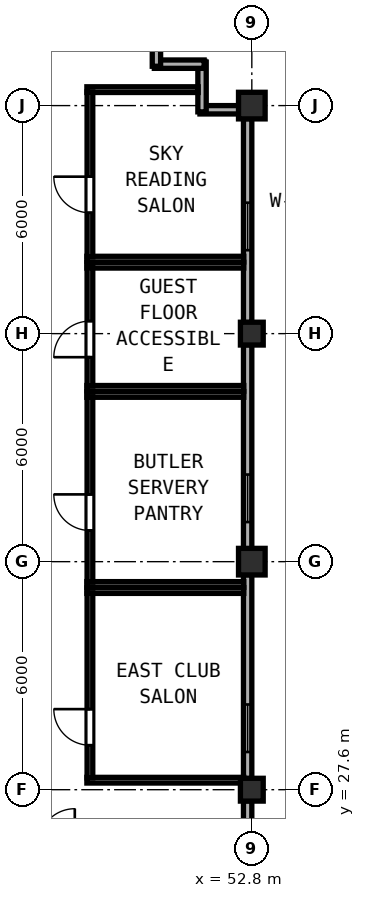
"""IFC4 building model, lengths in metres.
Left out: names, types, materials, properties, quantities, classifications, styles, units other than length and angle.
Written with IfcOpenShell. Run it as: python <this file> out.ifc"""

import sys

from ifc_helpers import new_model, si_unit, direction, frame, frame_2d, origin, origin_2d, place, context, subcontext, project, spatial, rectangle, hollow_rectangle, extrude, element, fill, save


model = new_model("IFC4")
c1 = context("Model", 3, precision=1e-05, world=origin(), true_north=direction((0.0, 1.0)))
c2 = subcontext(c1, "Body", "Model", "MODEL_VIEW")
j1 = project(units=[si_unit("LENGTHUNIT", "METRE"), si_unit("PLANEANGLEUNIT", "RADIAN")], contexts=[c1])
p1 = place(None, origin())
s1 = spatial("IfcSite", under=j1, at=p1, CompositionType="ELEMENT")
p2 = place(p1, origin())
s2 = spatial("IfcBuilding", under=s1, at=p2, CompositionType="ELEMENT")
p3 = place(p2, frame((0.0, 0.0, 286.1)))
s3 = spatial("IfcBuildingStorey", under=s2, at=p3, CompositionType="ELEMENT", Elevation=286.1)
for number, where, z_axis, x_axis in (
    (1, (52.8, 33.6, 0.0), (0.0, 0.0, 1.0), (1.0, 0.0, 0.0)),
    (2, (52.8, 45.6, 0.0), (0.0, 0.0, 1.0), (1.0, 0.0, 0.0)),
):
    element("IfcColumn", number, at=place(p3, frame(where, z_axis=z_axis, x_axis=x_axis)), inside=s3, PredefinedType="COLUMN", context=c2, shape_type="SweptSolid", body=[
        extrude(hollow_rectangle(XDim=0.7, YDim=0.7, WallThickness=0.026, at=origin_2d()), origin(), (0.0, 0.0, 1.0), 3.9),
    ])
for number, where, z_axis, x_axis in (
    (3, (52.8, 27.6, 0.0), (0.0, 0.0, 1.0), (1.0, 0.0, 0.0)),
    (4, (52.8, 39.6, 0.0), (0.0, 0.0, 1.0), (1.0, 0.0, 0.0)),
):
    element("IfcColumn", number, at=place(p3, frame(where, z_axis=z_axis, x_axis=x_axis)), inside=s3, PredefinedType="COLUMN", context=c2, shape_type="SweptSolid", body=[
        extrude(hollow_rectangle(XDim=0.6, YDim=0.6, WallThickness=0.024, at=origin_2d()), origin(), (0.0, 0.0, 1.0), 3.9),
    ])
p4 = place(p3, frame((52.69, 21.942, 0.0), z_axis=(0.0, 0.0, 1.0), x_axis=(0.0, 1.0, 0.0)))
e5 = element("IfcWall", 5, at=p4, inside=s3, PredefinedType="SOLIDWALL", context=c2, shape_type="SweptSolid", body=[
    extrude(rectangle(XDim=5.366, YDim=0.22, at=frame_2d((2.683, 0.0))), origin(), (0.0, 0.0, 1.0), 3.365),
])
p5 = place(p4, frame((0.7, 0.0, 0.85)))
e6 = element("IfcOpeningElement", 6, at=p5, cuts=e5, PredefinedType="OPENING", context=c2, shape_type="SweptSolid", body=[
    extrude(rectangle(XDim=1.25, YDim=1.95, at=frame_2d((0.625, 0.975))), frame((0.0, 0.12, 0.0), z_axis=(0.0, -1.0, 0.0), x_axis=(1.0, 0.0, 0.0)), (0.0, 0.0, 1.0), 0.24),
])
p6 = place(p3, frame((52.69, 27.892, 0.0), z_axis=(0.0, 0.0, 1.0), x_axis=(0.0, 1.0, 0.0)))
e7 = element("IfcWall", 7, at=p6, inside=s3, PredefinedType="SOLIDWALL", context=c2, shape_type="SweptSolid", body=[
    extrude(rectangle(XDim=5.366, YDim=0.22, at=frame_2d((2.683, 0.0))), origin(), (0.0, 0.0, 1.0), 3.365),
])
p7 = place(p6, frame((0.7, 0.0, 0.85)))
e8 = element("IfcOpeningElement", 8, at=p7, cuts=e7, PredefinedType="OPENING", context=c2, shape_type="SweptSolid", body=[
    extrude(rectangle(XDim=1.25, YDim=1.95, at=frame_2d((0.625, 0.975))), frame((0.0, 0.12, 0.0), z_axis=(0.0, -1.0, 0.0), x_axis=(1.0, 0.0, 0.0)), (0.0, 0.0, 1.0), 0.24),
])
p8 = place(p3, frame((52.69, 33.942, 0.0), z_axis=(0.0, 0.0, 1.0), x_axis=(0.0, 1.0, 0.0)))
e9 = element("IfcWall", 9, at=p8, inside=s3, PredefinedType="SOLIDWALL", context=c2, shape_type="SweptSolid", body=[
    extrude(rectangle(XDim=5.366, YDim=0.22, at=frame_2d((2.683, 0.0))), origin(), (0.0, 0.0, 1.0), 3.365),
])
p9 = place(p8, frame((0.7, 0.0, 0.85)))
e10 = element("IfcOpeningElement", 10, at=p9, cuts=e9, PredefinedType="OPENING", context=c2, shape_type="SweptSolid", body=[
    extrude(rectangle(XDim=1.25, YDim=1.95, at=frame_2d((0.625, 0.975))), frame((0.0, 0.12, 0.0), z_axis=(0.0, -1.0, 0.0), x_axis=(1.0, 0.0, 0.0)), (0.0, 0.0, 1.0), 0.24),
])
p10 = place(p3, frame((52.69, 39.892, 0.0), z_axis=(0.0, 0.0, 1.0), x_axis=(0.0, 1.0, 0.0)))
e11 = element("IfcWall", 11, at=p10, inside=s3, PredefinedType="SOLIDWALL", context=c2, shape_type="SweptSolid", body=[
    extrude(rectangle(XDim=5.366, YDim=0.22, at=frame_2d((2.683, 0.0))), origin(), (0.0, 0.0, 1.0), 3.365),
])
p11 = place(p10, frame((1.903, 0.0, 0.85)))
e12 = element("IfcOpeningElement", 12, at=p11, cuts=e11, PredefinedType="OPENING", context=c2, shape_type="SweptSolid", body=[
    extrude(rectangle(XDim=1.25, YDim=1.95, at=frame_2d((0.625, 0.975))), frame((0.0, 0.12, 0.0), z_axis=(0.0, -1.0, 0.0), x_axis=(1.0, 0.0, 0.0)), (0.0, 0.0, 1.0), 0.24),
])
p12 = place(p3, frame((52.458, 45.49, 0.0), z_axis=(0.0, 0.0, 1.0), x_axis=(-1.0, 0.0, 0.0)))
e13 = element("IfcWall", 13, at=p12, inside=s3, PredefinedType="SOLIDWALL", context=c2, shape_type="SweptSolid", body=[
    extrude(rectangle(XDim=1.023, YDim=0.22, at=frame_2d((0.511, 0.0))), origin(), (0.0, 0.0, 1.0), 3.72),
])
p13 = place(p3, frame((51.49, 45.435, 0.0), z_axis=(0.0, 0.0, 1.0), x_axis=(0.0, 1.0, 0.0)))
e14 = element("IfcWall", 14, at=p13, inside=s3, PredefinedType="SOLIDWALL", context=c2, shape_type="SweptSolid", body=[
    extrude(rectangle(XDim=1.31, YDim=0.22, at=frame_2d((0.655, 0.0))), origin(), (0.0, 0.0, 1.0), 3.72),
])
p14 = place(p3, frame((51.545, 46.69, 0.0), z_axis=(0.0, 0.0, 1.0), x_axis=(-1.0, 0.0, 0.0)))
e15 = element("IfcWall", 15, at=p14, inside=s3, PredefinedType="SOLIDWALL", context=c2, shape_type="SweptSolid", body=[
    extrude(rectangle(XDim=1.31, YDim=0.22, at=frame_2d((0.655, 0.0))), origin(), (0.0, 0.0, 1.0), 3.72),
])
p15 = place(p3, frame((50.29, 46.635, 0.0), z_axis=(0.0, 0.0, 1.0), x_axis=(0.0, 1.0, 0.0)))
e16 = element("IfcWall", 16, at=p15, inside=s3, PredefinedType="SOLIDWALL", context=c2, shape_type="SweptSolid", body=[
    extrude(rectangle(XDim=1.535, YDim=0.22, at=frame_2d((0.768, 0.0))), origin(), (0.0, 0.0, 1.0), 3.72),
])
for number, where, z_axis, x_axis in (
    (17, (48.46, 38.0, 0.0), (0.0, 0.0, 1.0), (1.0, 0.0, 0.0)),
    (18, (48.46, 33.0, 0.0), (0.0, 0.0, 1.0), (1.0, 0.0, 0.0)),
):
    element("IfcWall", number, at=place(p3, frame(where, z_axis=z_axis, x_axis=x_axis)), inside=s3, PredefinedType="PARTITIONING", context=c2, shape_type="SweptSolid", body=[
        extrude(rectangle(XDim=4.128, YDim=0.15, at=frame_2d((2.064, 0.0))), origin(), (0.0, 0.0, 1.0), 3.72),
    ])
p16 = place(p3, frame((48.54, 33.06, 0.0), z_axis=(0.0, 0.0, 1.0), x_axis=(0.0, 1.0, 0.0)))
e19 = element("IfcWall", 19, at=p16, inside=s3, PredefinedType="PARTITIONING", context=c2, shape_type="SweptSolid", body=[
    extrude(rectangle(XDim=4.88, YDim=0.15, at=frame_2d((2.44, 0.0))), origin(), (0.0, 0.0, 1.0), 3.72),
])
p17 = place(p16, frame((1.36, 0.0, 0.0)))
e20 = element("IfcOpeningElement", 20, at=p17, cuts=e19, PredefinedType="OPENING", context=c2, shape_type="SweptSolid", body=[
    extrude(rectangle(XDim=0.95, YDim=2.12, at=frame_2d((0.475, 1.06))), frame((0.0, 0.085, 0.0), z_axis=(0.0, -1.0, 0.0), x_axis=(1.0, 0.0, 0.0)), (0.0, 0.0, 1.0), 0.17),
])
for number, where, z_axis, x_axis in (
    (21, (48.46, 41.4, 0.0), (0.0, 0.0, 1.0), (1.0, 0.0, 0.0)),
    (22, (48.46, 38.16, 0.0), (0.0, 0.0, 1.0), (1.0, 0.0, 0.0)),
):
    element("IfcWall", number, at=place(p3, frame(where, z_axis=z_axis, x_axis=x_axis)), inside=s3, PredefinedType="PARTITIONING", context=c2, shape_type="SweptSolid", body=[
        extrude(rectangle(XDim=4.128, YDim=0.15, at=frame_2d((2.064, 0.0))), origin(), (0.0, 0.0, 1.0), 3.72),
    ])
p18 = place(p3, frame((48.54, 38.22, 0.0), z_axis=(0.0, 0.0, 1.0), x_axis=(0.0, 1.0, 0.0)))
e23 = element("IfcWall", 23, at=p18, inside=s3, PredefinedType="PARTITIONING", context=c2, shape_type="SweptSolid", body=[
    extrude(rectangle(XDim=3.12, YDim=0.15, at=frame_2d((1.56, 0.0))), origin(), (0.0, 0.0, 1.0), 3.72),
])
p19 = place(p18, frame((0.76, 0.0, 0.0)))
e24 = element("IfcOpeningElement", 24, at=p19, cuts=e23, PredefinedType="OPENING", context=c2, shape_type="SweptSolid", body=[
    extrude(rectangle(XDim=0.95, YDim=2.12, at=frame_2d((0.475, 1.06))), frame((0.0, 0.085, 0.0), z_axis=(0.0, -1.0, 0.0), x_axis=(1.0, 0.0, 0.0)), (0.0, 0.0, 1.0), 0.17),
])
p20 = place(p3, frame((48.46, 46.02, 0.0), z_axis=(0.0, 0.0, 1.0), x_axis=(1.0, 0.0, 0.0)))
e25 = element("IfcWall", 25, at=p20, inside=s3, PredefinedType="PARTITIONING", context=c2, shape_type="SweptSolid", body=[
    extrude(rectangle(XDim=2.928, YDim=0.15, at=frame_2d((1.464, 0.0))), origin(), (0.0, 0.0, 1.0), 3.72),
])
p21 = place(p3, frame((48.46, 41.56, 0.0), z_axis=(0.0, 0.0, 1.0), x_axis=(1.0, 0.0, 0.0)))
e26 = element("IfcWall", 26, at=p21, inside=s3, PredefinedType="PARTITIONING", context=c2, shape_type="SweptSolid", body=[
    extrude(rectangle(XDim=4.128, YDim=0.15, at=frame_2d((2.064, 0.0))), origin(), (0.0, 0.0, 1.0), 3.72),
])
p22 = place(p3, frame((48.54, 41.62, 0.0), z_axis=(0.0, 0.0, 1.0), x_axis=(0.0, 1.0, 0.0)))
e27 = element("IfcWall", 27, at=p22, inside=s3, PredefinedType="PARTITIONING", context=c2, shape_type="SweptSolid", body=[
    extrude(rectangle(XDim=4.34, YDim=0.15, at=frame_2d((2.17, 0.0))), origin(), (0.0, 0.0, 1.0), 3.72),
])
p23 = place(p22, frame((1.16, 0.0, 0.0)))
e28 = element("IfcOpeningElement", 28, at=p23, cuts=e27, PredefinedType="OPENING", context=c2, shape_type="SweptSolid", body=[
    extrude(rectangle(XDim=0.95, YDim=2.12, at=frame_2d((0.475, 1.06))), frame((0.0, 0.085, 0.0), z_axis=(0.0, -1.0, 0.0), x_axis=(1.0, 0.0, 0.0)), (0.0, 0.0, 1.0), 0.17),
])
for number, where, z_axis, x_axis in (
    (29, (48.46, 32.84, 0.0), (0.0, 0.0, 1.0), (1.0, 0.0, 0.0)),
    (30, (48.46, 27.85, 0.0), (0.0, 0.0, 1.0), (1.0, 0.0, 0.0)),
):
    element("IfcWall", number, at=place(p3, frame(where, z_axis=z_axis, x_axis=x_axis)), inside=s3, PredefinedType="PARTITIONING", context=c2, shape_type="SweptSolid", body=[
        extrude(rectangle(XDim=4.128, YDim=0.15, at=frame_2d((2.064, 0.0))), origin(), (0.0, 0.0, 1.0), 3.72),
    ])
p24 = place(p3, frame((48.54, 27.91, 0.0), z_axis=(0.0, 0.0, 1.0), x_axis=(0.0, 1.0, 0.0)))
e31 = element("IfcWall", 31, at=p24, inside=s3, PredefinedType="PARTITIONING", context=c2, shape_type="SweptSolid", body=[
    extrude(rectangle(XDim=4.87, YDim=0.15, at=frame_2d((2.435, 0.0))), origin(), (0.0, 0.0, 1.0), 3.72),
])
p25 = place(p24, frame((0.86, 0.0, 0.0)))
e32 = element("IfcOpeningElement", 32, at=p25, cuts=e31, PredefinedType="OPENING", context=c2, shape_type="SweptSolid", body=[
    extrude(rectangle(XDim=0.95, YDim=2.12, at=frame_2d((0.475, 1.06))), frame((0.0, 0.085, 0.0), z_axis=(0.0, -1.0, 0.0), x_axis=(1.0, 0.0, 0.0)), (0.0, 0.0, 1.0), 0.17),
])
p26 = place(p7, origin())
e33 = element("IfcWindow", 33, at=p26, inside=s3, PartitioningType="SINGLE_PANEL", PredefinedType="WINDOW", context=c2, shape_type="SweptSolid", body=[
    extrude(rectangle(XDim=1.25, YDim=1.95, at=frame_2d((0.625, 0.975))), frame((0.0, 0.03, 0.0), z_axis=(0.0, -1.0, 0.0), x_axis=(1.0, 0.0, 0.0)), (0.0, 0.0, 1.0), 0.06),
])
fill(e8, e33)
p27 = place(p9, origin())
e34 = element("IfcWindow", 34, at=p27, inside=s3, PartitioningType="SINGLE_PANEL", PredefinedType="WINDOW", context=c2, shape_type="SweptSolid", body=[
    extrude(rectangle(XDim=1.25, YDim=1.95, at=frame_2d((0.625, 0.975))), frame((0.0, 0.03, 0.0), z_axis=(0.0, -1.0, 0.0), x_axis=(1.0, 0.0, 0.0)), (0.0, 0.0, 1.0), 0.06),
])
fill(e10, e34)
p28 = place(p11, origin())
e35 = element("IfcWindow", 35, at=p28, inside=s3, PartitioningType="SINGLE_PANEL", PredefinedType="WINDOW", context=c2, shape_type="SweptSolid", body=[
    extrude(rectangle(XDim=1.25, YDim=1.95, at=frame_2d((0.625, 0.975))), frame((0.0, 0.03, 0.0), z_axis=(0.0, -1.0, 0.0), x_axis=(1.0, 0.0, 0.0)), (0.0, 0.0, 1.0), 0.06),
])
fill(e12, e35)
p29 = place(p17, origin())
e36 = element("IfcDoor", 36, at=p29, inside=s3, OperationType="SINGLE_SWING_RIGHT", PredefinedType="DOOR", context=c2, shape_type="SweptSolid", body=[
    extrude(rectangle(XDim=0.95, YDim=2.12, at=frame_2d((0.475, 1.06))), frame((0.0, 0.025, 0.0), z_axis=(0.0, -1.0, 0.0), x_axis=(1.0, 0.0, 0.0)), (0.0, 0.0, 1.0), 0.05),
])
fill(e20, e36)
p30 = place(p19, origin())
e37 = element("IfcDoor", 37, at=p30, inside=s3, OperationType="SINGLE_SWING_LEFT", PredefinedType="DOOR", context=c2, shape_type="SweptSolid", body=[
    extrude(rectangle(XDim=0.95, YDim=2.12, at=frame_2d((0.475, 1.06))), frame((0.0, 0.025, 0.0), z_axis=(0.0, -1.0, 0.0), x_axis=(1.0, 0.0, 0.0)), (0.0, 0.0, 1.0), 0.05),
])
fill(e24, e37)
p31 = place(p23, origin())
e38 = element("IfcDoor", 38, at=p31, inside=s3, OperationType="SINGLE_SWING_RIGHT", PredefinedType="DOOR", context=c2, shape_type="SweptSolid", body=[
    extrude(rectangle(XDim=0.95, YDim=2.12, at=frame_2d((0.475, 1.06))), frame((0.0, 0.025, 0.0), z_axis=(0.0, -1.0, 0.0), x_axis=(1.0, 0.0, 0.0)), (0.0, 0.0, 1.0), 0.05),
])
fill(e28, e38)
p32 = place(p25, origin())
e39 = element("IfcDoor", 39, at=p32, inside=s3, OperationType="SINGLE_SWING_RIGHT", PredefinedType="DOOR", context=c2, shape_type="SweptSolid", body=[
    extrude(rectangle(XDim=0.95, YDim=2.12, at=frame_2d((0.475, 1.06))), frame((0.0, 0.025, 0.0), z_axis=(0.0, -1.0, 0.0), x_axis=(1.0, 0.0, 0.0)), (0.0, 0.0, 1.0), 0.05),
])
fill(e32, e39)
save(model, sys.argv[1])
